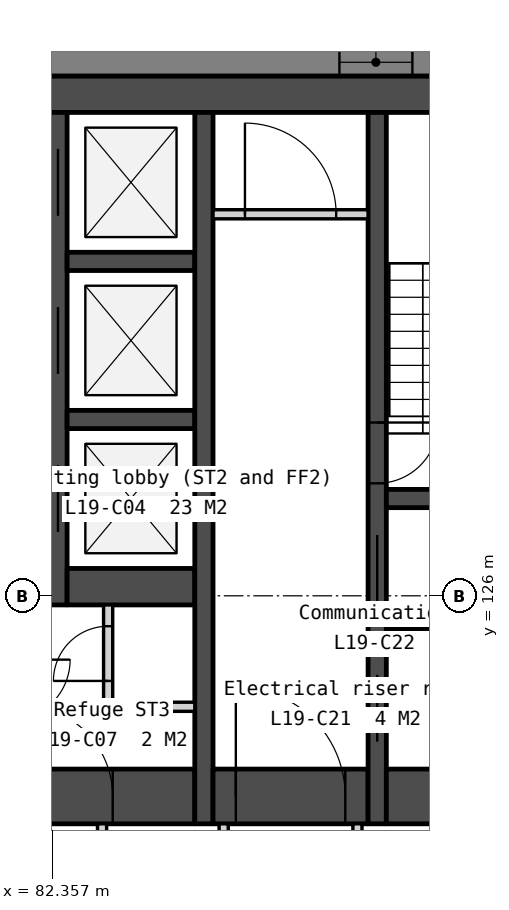
"""IFC4 building model, lengths in metres.
Left out: names, types, materials, properties, quantities, classifications, styles, units other than length and angle.
Written with IfcOpenShell. Run it as: python <this file> out.ifc"""

import sys

from ifc_helpers import new_model, si_unit, direction, frame, frame_2d, origin, place, context, subcontext, project, spatial, polyline, rectangle, outline, extrude, element, fill, save


model = new_model("IFC4")
c1 = context("Model", 3, precision=1e-05, world=origin(), true_north=direction((0.0, 1.0)))
c2 = subcontext(c1, "Body", "Model", "MODEL_VIEW")
j1 = project(units=[si_unit("LENGTHUNIT", "METRE"), si_unit("PLANEANGLEUNIT", "RADIAN")], contexts=[c1])
p1 = place(None, origin())
s1 = spatial("IfcSite", under=j1, at=p1, CompositionType="ELEMENT")
p2 = place(p1, origin())
s2 = spatial("IfcBuilding", under=s1, at=p2, CompositionType="ELEMENT")
p3 = place(p2, frame((0.0, 0.0, 81.8)))
s3 = spatial("IfcBuildingStorey", under=s2, at=p3, CompositionType="ELEMENT", Elevation=81.8)
p4 = place(p3, frame((66.0, 134.25, 0.0), z_axis=(0.0, 0.0, 1.0), x_axis=(1.0, 0.0, 0.0)))
e1 = element("IfcWall", 1, at=p4, inside=s3, PredefinedType="SOLIDWALL", context=c2, shape_type="SweptSolid", body=[
    extrude(rectangle(XDim=28.0, YDim=0.6, at=frame_2d((14.0, 0.0))), origin(), (0.0, 0.0, 1.0), 3.35),
])
p5 = place(p3, frame((81.8, 122.7, 0.0), z_axis=(0.0, 0.0, 1.0), x_axis=(1.0, 0.0, 0.0)))
e2 = element("IfcWall", 2, at=p5, inside=s3, PredefinedType="SOLIDWALL", context=c2, shape_type="SweptSolid", body=[
    extrude(rectangle(XDim=2.9, YDim=0.9, at=frame_2d((1.45, 0.0))), origin(), (0.0, 0.0, 1.0), 3.35),
])
p6 = place(p5, frame((0.05, 0.0, 0.0)))
e3 = element("IfcOpeningElement", 3, at=p6, cuts=e2, PredefinedType="OPENING", context=c2, shape_type="SweptSolid", body=[
    extrude(rectangle(XDim=1.5, YDim=2.1, at=frame_2d((0.75, 1.05))), frame((0.0, 0.46, 0.0), z_axis=(0.0, -1.0, 0.0), x_axis=(1.0, 0.0, 0.0)), (0.0, 0.0, 1.0), 0.92),
])
p7 = place(p3, frame((82.45, 133.95, 0.0), z_axis=(0.0, 0.0, 1.0), x_axis=(0.0, -1.0, 0.0)))
e4 = element("IfcWall", 4, at=p7, inside=s3, PredefinedType="SOLIDWALL", context=c2, shape_type="SweptSolid", body=[
    extrude(rectangle(XDim=8.1, YDim=0.3, at=frame_2d((4.05, 0.0))), origin(), (0.0, 0.0, 1.0), 3.35),
])
p8 = place(p7, frame((0.6, 0.0, 0.0)))
e5 = element("IfcOpeningElement", 5, at=p8, cuts=e4, PredefinedType="OPENING", context=c2, shape_type="SweptSolid", body=[
    extrude(rectangle(XDim=1.1, YDim=2.1, at=frame_2d((0.55, 1.05))), frame((0.0, 0.16, 0.0), z_axis=(0.0, -1.0, 0.0), x_axis=(1.0, 0.0, 0.0)), (0.0, 0.0, 1.0), 0.32),
])
p9 = place(p7, frame((3.2, 0.0, 0.0)))
e6 = element("IfcOpeningElement", 6, at=p9, cuts=e4, PredefinedType="OPENING", context=c2, shape_type="SweptSolid", body=[
    extrude(rectangle(XDim=1.1, YDim=2.1, at=frame_2d((0.55, 1.05))), frame((0.0, 0.16, 0.0), z_axis=(0.0, -1.0, 0.0), x_axis=(1.0, 0.0, 0.0)), (0.0, 0.0, 1.0), 0.32),
])
p10 = place(p7, frame((5.8, 0.0, 0.0)))
e7 = element("IfcOpeningElement", 7, at=p10, cuts=e4, PredefinedType="OPENING", context=c2, shape_type="SweptSolid", body=[
    extrude(rectangle(XDim=1.1, YDim=2.1, at=frame_2d((0.55, 1.05))), frame((0.0, 0.16, 0.0), z_axis=(0.0, -1.0, 0.0), x_axis=(1.0, 0.0, 0.0)), (0.0, 0.0, 1.0), 0.32),
])
for number, where, z_axis, x_axis in (
    (8, (82.6, 131.5, 0.0), (0.0, 0.0, 1.0), (1.0, 0.0, 0.0)),
    (9, (82.6, 128.9, 0.0), (0.0, 0.0, 1.0), (1.0, 0.0, 0.0)),
):
    element("IfcWall", number, at=place(p3, frame(where, z_axis=z_axis, x_axis=x_axis)), inside=s3, PredefinedType="SOLIDWALL", context=c2, shape_type="SweptSolid", body=[
        extrude(rectangle(XDim=2.1, YDim=0.3, at=frame_2d((1.05, 0.0))), origin(), (0.0, 0.0, 1.0), 3.35),
    ])
p11 = place(p3, frame((82.6, 126.15, 0.0), z_axis=(0.0, 0.0, 1.0), x_axis=(1.0, 0.0, 0.0)))
e10 = element("IfcWall", 10, at=p11, inside=s3, PredefinedType="SOLIDWALL", context=c2, shape_type="SweptSolid", body=[
    extrude(rectangle(XDim=2.1, YDim=0.6, at=frame_2d((1.05, 0.0))), origin(), (0.0, 0.0, 1.0), 3.35),
])
p12 = place(p3, frame((83.175, 122.25, 0.0), z_axis=(0.0, 0.0, 1.0), x_axis=(0.0, -1.0, 0.0)))
e11 = element("IfcWall", 11, at=p12, inside=s3, PredefinedType="PARTITIONING", context=c2, shape_type="SweptSolid", body=[
    extrude(rectangle(XDim=2.1, YDim=0.15, at=frame_2d((1.05, 0.0))), origin(), (0.0, 0.0, 1.0), 3.35),
])
p13 = place(p3, frame((83.275, 125.85, 0.0), z_axis=(0.0, 0.0, 1.0), x_axis=(0.0, -1.0, 0.0)))
e12 = element("IfcWall", 12, at=p13, inside=s3, PredefinedType="PARTITIONING", context=c2, shape_type="SweptSolid", body=[
    extrude(rectangle(XDim=1.75, YDim=0.15, at=frame_2d((0.875, 0.0))), origin(), (0.0, 0.0, 1.0), 3.35),
])
p14 = place(p13, frame((0.35, 0.0, 0.0)))
e13 = element("IfcOpeningElement", 13, at=p14, cuts=e12, PredefinedType="OPENING", context=c2, shape_type="SweptSolid", body=[
    extrude(rectangle(XDim=0.9, YDim=2.1, at=frame_2d((0.45, 1.05))), frame((0.0, 0.085, 0.0), z_axis=(0.0, -1.0, 0.0), x_axis=(1.0, 0.0, 0.0)), (0.0, 0.0, 1.0), 0.17),
])
p15 = place(p3, frame((83.35, 124.175, 0.0), z_axis=(0.0, 0.0, 1.0), x_axis=(1.0, 0.0, 0.0)))
e14 = element("IfcWall", 14, at=p15, inside=s3, PredefinedType="PARTITIONING", context=c2, shape_type="SweptSolid", body=[
    extrude(rectangle(XDim=1.35, YDim=0.15, at=frame_2d((0.675, 0.0))), origin(), (0.0, 0.0, 1.0), 3.35),
])
p16 = place(p3, frame((84.85, 133.95, 0.0), z_axis=(0.0, 0.0, 1.0), x_axis=(0.0, -1.0, 0.0)))
e15 = element("IfcWall", 15, at=p16, inside=s3, PredefinedType="SOLIDWALL", context=c2, shape_type="SweptSolid", body=[
    extrude(rectangle(XDim=11.7, YDim=0.3, at=frame_2d((5.85, 0.0))), origin(), (0.0, 0.0, 1.0), 3.35),
])
p17 = place(p3, frame((85.0, 132.275, 0.0), z_axis=(0.0, 0.0, 1.0), x_axis=(1.0, 0.0, 0.0)))
e16 = element("IfcWall", 16, at=p17, inside=s3, PredefinedType="PARTITIONING", context=c2, shape_type="SweptSolid", body=[
    extrude(rectangle(XDim=2.55, YDim=0.15, at=frame_2d((1.275, 0.0))), origin(), (0.0, 0.0, 1.0), 3.35),
])
p18 = place(p17, frame((0.525, 0.0, 0.0)))
e17 = element("IfcOpeningElement", 17, at=p18, cuts=e16, PredefinedType="OPENING", context=c2, shape_type="SweptSolid", body=[
    extrude(rectangle(XDim=1.5, YDim=2.1, at=frame_2d((0.75, 1.05))), frame((0.0, 0.085, 0.0), z_axis=(0.0, -1.0, 0.0), x_axis=(1.0, 0.0, 0.0)), (0.0, 0.0, 1.0), 0.17),
])
p19 = place(p3, frame((85.0, 122.7, 0.0), z_axis=(0.0, 0.0, 1.0), x_axis=(1.0, 0.0, 0.0)))
e18 = element("IfcWall", 18, at=p19, inside=s3, PredefinedType="SOLIDWALL", context=c2, shape_type="SweptSolid", body=[
    extrude(rectangle(XDim=2.55, YDim=0.9, at=frame_2d((1.275, 0.0))), origin(), (0.0, 0.0, 1.0), 3.35),
])
p20 = place(p19, frame((0.375, 0.0, 0.0)))
e19 = element("IfcOpeningElement", 19, at=p20, cuts=e18, PredefinedType="OPENING", context=c2, shape_type="SweptSolid", body=[
    extrude(rectangle(XDim=1.8, YDim=2.1, at=frame_2d((0.9, 1.05))), frame((0.0, 0.46, 0.0), z_axis=(0.0, -1.0, 0.0), x_axis=(1.0, 0.0, 0.0)), (0.0, 0.0, 1.0), 0.92),
])
p21 = place(p3, frame((85.175, 122.25, 0.0), z_axis=(0.0, 0.0, 1.0), x_axis=(0.0, -1.0, 0.0)))
e20 = element("IfcWall", 20, at=p21, inside=s3, PredefinedType="PARTITIONING", context=c2, shape_type="SweptSolid", body=[
    extrude(rectangle(XDim=2.1, YDim=0.15, at=frame_2d((1.05, 0.0))), origin(), (0.0, 0.0, 1.0), 3.35),
])
p22 = place(p21, frame((0.55, 0.0, 0.0)))
e21 = element("IfcOpeningElement", 21, at=p22, cuts=e20, PredefinedType="OPENING", context=c2, shape_type="SweptSolid", body=[
    extrude(rectangle(XDim=1.0, YDim=2.1, at=frame_2d((0.5, 1.05))), frame((0.0, 0.085, 0.0), z_axis=(0.0, -1.0, 0.0), x_axis=(1.0, 0.0, 0.0)), (0.0, 0.0, 1.0), 0.17),
])
p23 = place(p3, frame((87.375, 122.25, 0.0), z_axis=(0.0, 0.0, 1.0), x_axis=(0.0, -1.0, 0.0)))
e22 = element("IfcWall", 22, at=p23, inside=s3, PredefinedType="PARTITIONING", context=c2, shape_type="SweptSolid", body=[
    extrude(rectangle(XDim=2.1, YDim=0.15, at=frame_2d((1.05, 0.0))), origin(), (0.0, 0.0, 1.0), 3.35),
])
p24 = place(p3, frame((87.7, 133.95, 0.0), z_axis=(0.0, 0.0, 1.0), x_axis=(0.0, -1.0, 0.0)))
e23 = element("IfcWall", 23, at=p24, inside=s3, PredefinedType="SOLIDWALL", context=c2, shape_type="SweptSolid", body=[
    extrude(rectangle(XDim=11.7, YDim=0.3, at=frame_2d((5.85, 0.0))), origin(), (0.0, 0.0, 1.0), 3.35),
])
p25 = place(p24, frame((6.95, 0.0, 0.0)))
e24 = element("IfcOpeningElement", 24, at=p25, cuts=e23, PredefinedType="OPENING", context=c2, shape_type="SweptSolid", body=[
    extrude(rectangle(XDim=1.1, YDim=2.1, at=frame_2d((0.55, 1.05))), frame((0.0, 0.16, 0.0), z_axis=(0.0, -1.0, 0.0), x_axis=(1.0, 0.0, 0.0)), (0.0, 0.0, 1.0), 0.32),
])
p26 = place(p24, frame((5.1, 0.0, 0.0)))
e25 = element("IfcOpeningElement", 25, at=p26, cuts=e23, PredefinedType="OPENING", context=c2, shape_type="SweptSolid", body=[
    extrude(rectangle(XDim=1.0, YDim=2.1, at=frame_2d((0.5, 1.05))), frame((0.0, 0.16, 0.0), z_axis=(0.0, -1.0, 0.0), x_axis=(1.0, 0.0, 0.0)), (0.0, 0.0, 1.0), 0.32),
])
p27 = place(p24, frame((9.25, 0.0, 0.0)))
e26 = element("IfcOpeningElement", 26, at=p27, cuts=e23, PredefinedType="OPENING", context=c2, shape_type="SweptSolid", body=[
    extrude(rectangle(XDim=1.1, YDim=2.1, at=frame_2d((0.55, 1.05))), frame((0.0, 0.16, 0.0), z_axis=(0.0, -1.0, 0.0), x_axis=(1.0, 0.0, 0.0)), (0.0, 0.0, 1.0), 0.32),
])
for number, where, z_axis, x_axis in (
    (27, (87.85, 127.6, 0.0), (0.0, 0.0, 1.0), (1.0, 0.0, 0.0)),
    (28, (87.85, 125.3, 0.0), (0.0, 0.0, 1.0), (1.0, 0.0, 0.0)),
):
    element("IfcWall", number, at=place(p3, frame(where, z_axis=z_axis, x_axis=x_axis)), inside=s3, PredefinedType="SOLIDWALL", context=c2, shape_type="SweptSolid", body=[
        extrude(rectangle(XDim=2.55, YDim=0.3, at=frame_2d((1.275, 0.0))), origin(), (0.0, 0.0, 1.0), 3.35),
    ])
p28 = place(p3, frame((87.85, 122.7, 0.0), z_axis=(0.0, 0.0, 1.0), x_axis=(1.0, 0.0, 0.0)))
e29 = element("IfcWall", 29, at=p28, inside=s3, PredefinedType="SOLIDWALL", context=c2, shape_type="SweptSolid", body=[
    extrude(rectangle(XDim=2.55, YDim=0.9, at=frame_2d((1.275, 0.0))), origin(), (0.0, 0.0, 1.0), 3.35),
])
p29 = place(p3, frame((101.322, 134.775, -0.45), z_axis=(0.0, 0.0, 1.0), x_axis=(-1.0, 0.0, 0.0)))
e30 = element("IfcWall", 30, at=p29, inside=s3, PredefinedType="SOLIDWALL", context=c2, shape_type="SweptSolid", body=[
    extrude(outline(polyline([(42.643, 0.0), (42.643, 3.8), (0.0, 3.8), (0.0, 0.0), (42.643, 0.0)])), frame((0.0, 0.225, 0.0), z_axis=(0.0, -1.0, 0.0), x_axis=(1.0, 0.0, 0.0)), (0.0, 0.0, 1.0), 0.45),
])
p30 = place(p29, frame((2.814, 0.0, 1.35)))
e31 = element("IfcOpeningElement", 31, at=p30, cuts=e30, PredefinedType="OPENING", context=c2, shape_type="SweptSolid", body=[
    extrude(rectangle(XDim=1.2, YDim=1.5, at=frame_2d((0.6, 0.75))), frame((0.0, 0.235, 0.0), z_axis=(0.0, -1.0, 0.0), x_axis=(1.0, 0.0, 0.0)), (0.0, 0.0, 1.0), 0.47),
])
p31 = place(p29, frame((4.514, 0.0, 1.35)))
e32 = element("IfcOpeningElement", 32, at=p31, cuts=e30, PredefinedType="OPENING", context=c2, shape_type="SweptSolid", body=[
    extrude(rectangle(XDim=1.2, YDim=1.5, at=frame_2d((0.6, 0.75))), frame((0.0, 0.235, 0.0), z_axis=(0.0, -1.0, 0.0), x_axis=(1.0, 0.0, 0.0)), (0.0, 0.0, 1.0), 0.47),
])
p32 = place(p29, frame((11.343, 0.0, 1.35)))
e33 = element("IfcOpeningElement", 33, at=p32, cuts=e30, PredefinedType="OPENING", context=c2, shape_type="SweptSolid", body=[
    extrude(rectangle(XDim=1.2, YDim=1.5, at=frame_2d((0.6, 0.75))), frame((0.0, 0.235, 0.0), z_axis=(0.0, -1.0, 0.0), x_axis=(1.0, 0.0, 0.0)), (0.0, 0.0, 1.0), 0.47),
])
p33 = place(p29, frame((13.043, 0.0, 1.35)))
e34 = element("IfcOpeningElement", 34, at=p33, cuts=e30, PredefinedType="OPENING", context=c2, shape_type="SweptSolid", body=[
    extrude(rectangle(XDim=1.2, YDim=1.5, at=frame_2d((0.6, 0.75))), frame((0.0, 0.235, 0.0), z_axis=(0.0, -1.0, 0.0), x_axis=(1.0, 0.0, 0.0)), (0.0, 0.0, 1.0), 0.47),
])
p34 = place(p29, frame((19.872, 0.0, 1.35)))
e35 = element("IfcOpeningElement", 35, at=p34, cuts=e30, PredefinedType="OPENING", context=c2, shape_type="SweptSolid", body=[
    extrude(rectangle(XDim=1.2, YDim=1.5, at=frame_2d((0.6, 0.75))), frame((0.0, 0.235, 0.0), z_axis=(0.0, -1.0, 0.0), x_axis=(1.0, 0.0, 0.0)), (0.0, 0.0, 1.0), 0.47),
])
p35 = place(p29, frame((21.572, 0.0, 1.35)))
e36 = element("IfcOpeningElement", 36, at=p35, cuts=e30, PredefinedType="OPENING", context=c2, shape_type="SweptSolid", body=[
    extrude(rectangle(XDim=1.2, YDim=1.5, at=frame_2d((0.6, 0.75))), frame((0.0, 0.235, 0.0), z_axis=(0.0, -1.0, 0.0), x_axis=(1.0, 0.0, 0.0)), (0.0, 0.0, 1.0), 0.47),
])
p36 = place(p29, frame((28.4, 0.0, 1.35)))
e37 = element("IfcOpeningElement", 37, at=p36, cuts=e30, PredefinedType="OPENING", context=c2, shape_type="SweptSolid", body=[
    extrude(rectangle(XDim=1.2, YDim=1.5, at=frame_2d((0.6, 0.75))), frame((0.0, 0.235, 0.0), z_axis=(0.0, -1.0, 0.0), x_axis=(1.0, 0.0, 0.0)), (0.0, 0.0, 1.0), 0.47),
])
p37 = place(p29, frame((30.1, 0.0, 1.35)))
e38 = element("IfcOpeningElement", 38, at=p37, cuts=e30, PredefinedType="OPENING", context=c2, shape_type="SweptSolid", body=[
    extrude(rectangle(XDim=1.2, YDim=1.5, at=frame_2d((0.6, 0.75))), frame((0.0, 0.235, 0.0), z_axis=(0.0, -1.0, 0.0), x_axis=(1.0, 0.0, 0.0)), (0.0, 0.0, 1.0), 0.47),
])
p38 = place(p29, frame((36.929, 0.0, 1.35)))
e39 = element("IfcOpeningElement", 39, at=p38, cuts=e30, PredefinedType="OPENING", context=c2, shape_type="SweptSolid", body=[
    extrude(rectangle(XDim=1.2, YDim=1.5, at=frame_2d((0.6, 0.75))), frame((0.0, 0.235, 0.0), z_axis=(0.0, -1.0, 0.0), x_axis=(1.0, 0.0, 0.0)), (0.0, 0.0, 1.0), 0.47),
])
p39 = place(p29, frame((38.629, 0.0, 1.35)))
e40 = element("IfcOpeningElement", 40, at=p39, cuts=e30, PredefinedType="OPENING", context=c2, shape_type="SweptSolid", body=[
    extrude(rectangle(XDim=1.2, YDim=1.5, at=frame_2d((0.6, 0.75))), frame((0.0, 0.235, 0.0), z_axis=(0.0, -1.0, 0.0), x_axis=(1.0, 0.0, 0.0)), (0.0, 0.0, 1.0), 0.47),
])
p40 = place(p3, frame((82.605, 93.333, -0.45), z_axis=(0.0, 0.0, 1.0), x_axis=(0.500000478905, 0.866025127289, 0.0)))
e41 = element("IfcWall", 41, at=p40, inside=s3, PredefinedType="SOLIDWALL", context=c2, shape_type="SweptSolid", body=[
    extrude(outline(polyline([(42.643, 0.0), (42.643, 3.8), (0.0, 3.8), (0.0, 0.0), (42.643, 0.0)])), frame((0.0, 0.225, 0.0), z_axis=(0.0, -1.0, 0.0), x_axis=(1.0, 0.0, 0.0)), (0.0, 0.0, 1.0), 0.45),
])
p41 = place(p40, frame((2.814, 0.0, 1.35)))
e42 = element("IfcOpeningElement", 42, at=p41, cuts=e41, PredefinedType="OPENING", context=c2, shape_type="SweptSolid", body=[
    extrude(rectangle(XDim=1.2, YDim=1.5, at=frame_2d((0.6, 0.75))), frame((0.0, 0.235, 0.0), z_axis=(0.0, -1.0, 0.0), x_axis=(1.0, 0.0, 0.0)), (0.0, 0.0, 1.0), 0.47),
])
p42 = place(p40, frame((4.514, 0.0, 1.35)))
e43 = element("IfcOpeningElement", 43, at=p42, cuts=e41, PredefinedType="OPENING", context=c2, shape_type="SweptSolid", body=[
    extrude(rectangle(XDim=1.2, YDim=1.5, at=frame_2d((0.6, 0.75))), frame((0.0, 0.235, 0.0), z_axis=(0.0, -1.0, 0.0), x_axis=(1.0, 0.0, 0.0)), (0.0, 0.0, 1.0), 0.47),
])
p43 = place(p40, frame((11.343, 0.0, 1.35)))
e44 = element("IfcOpeningElement", 44, at=p43, cuts=e41, PredefinedType="OPENING", context=c2, shape_type="SweptSolid", body=[
    extrude(rectangle(XDim=1.2, YDim=1.5, at=frame_2d((0.6, 0.75))), frame((0.0, 0.235, 0.0), z_axis=(0.0, -1.0, 0.0), x_axis=(1.0, 0.0, 0.0)), (0.0, 0.0, 1.0), 0.47),
])
p44 = place(p40, frame((13.043, 0.0, 1.35)))
e45 = element("IfcOpeningElement", 45, at=p44, cuts=e41, PredefinedType="OPENING", context=c2, shape_type="SweptSolid", body=[
    extrude(rectangle(XDim=1.2, YDim=1.5, at=frame_2d((0.6, 0.75))), frame((0.0, 0.235, 0.0), z_axis=(0.0, -1.0, 0.0), x_axis=(1.0, 0.0, 0.0)), (0.0, 0.0, 1.0), 0.47),
])
p45 = place(p40, frame((19.872, 0.0, 1.35)))
e46 = element("IfcOpeningElement", 46, at=p45, cuts=e41, PredefinedType="OPENING", context=c2, shape_type="SweptSolid", body=[
    extrude(rectangle(XDim=1.2, YDim=1.5, at=frame_2d((0.6, 0.75))), frame((0.0, 0.235, 0.0), z_axis=(0.0, -1.0, 0.0), x_axis=(1.0, 0.0, 0.0)), (0.0, 0.0, 1.0), 0.47),
])
p46 = place(p40, frame((21.572, 0.0, 1.35)))
e47 = element("IfcOpeningElement", 47, at=p46, cuts=e41, PredefinedType="OPENING", context=c2, shape_type="SweptSolid", body=[
    extrude(rectangle(XDim=1.2, YDim=1.5, at=frame_2d((0.6, 0.75))), frame((0.0, 0.235, 0.0), z_axis=(0.0, -1.0, 0.0), x_axis=(1.0, 0.0, 0.0)), (0.0, 0.0, 1.0), 0.47),
])
p47 = place(p40, frame((28.4, 0.0, 1.35)))
e48 = element("IfcOpeningElement", 48, at=p47, cuts=e41, PredefinedType="OPENING", context=c2, shape_type="SweptSolid", body=[
    extrude(rectangle(XDim=1.2, YDim=1.5, at=frame_2d((0.6, 0.75))), frame((0.0, 0.235, 0.0), z_axis=(0.0, -1.0, 0.0), x_axis=(1.0, 0.0, 0.0)), (0.0, 0.0, 1.0), 0.47),
])
p48 = place(p40, frame((30.1, 0.0, 1.35)))
e49 = element("IfcOpeningElement", 49, at=p48, cuts=e41, PredefinedType="OPENING", context=c2, shape_type="SweptSolid", body=[
    extrude(rectangle(XDim=1.2, YDim=1.5, at=frame_2d((0.6, 0.75))), frame((0.0, 0.235, 0.0), z_axis=(0.0, -1.0, 0.0), x_axis=(1.0, 0.0, 0.0)), (0.0, 0.0, 1.0), 0.47),
])
p49 = place(p40, frame((36.929, 0.0, 1.35)))
e50 = element("IfcOpeningElement", 50, at=p49, cuts=e41, PredefinedType="OPENING", context=c2, shape_type="SweptSolid", body=[
    extrude(rectangle(XDim=1.2, YDim=1.5, at=frame_2d((0.6, 0.75))), frame((0.0, 0.235, 0.0), z_axis=(0.0, -1.0, 0.0), x_axis=(1.0, 0.0, 0.0)), (0.0, 0.0, 1.0), 0.47),
])
p50 = place(p40, frame((38.629, 0.0, 1.35)))
e51 = element("IfcOpeningElement", 51, at=p50, cuts=e41, PredefinedType="OPENING", context=c2, shape_type="SweptSolid", body=[
    extrude(rectangle(XDim=1.2, YDim=1.5, at=frame_2d((0.6, 0.75))), frame((0.0, 0.235, 0.0), z_axis=(0.0, -1.0, 0.0), x_axis=(1.0, 0.0, 0.0)), (0.0, 0.0, 1.0), 0.47),
])
p51 = place(p8, origin())
e52 = element("IfcDoor", 52, at=p51, inside=s3, OperationType="SLIDING_TO_LEFT", PredefinedType="DOOR", context=c2, shape_type="SweptSolid", body=[
    extrude(rectangle(XDim=1.1, YDim=2.1, at=frame_2d((0.55, 1.05))), frame((0.0, 0.025, 0.0), z_axis=(0.0, -1.0, 0.0), x_axis=(1.0, 0.0, 0.0)), (0.0, 0.0, 1.0), 0.05),
])
fill(e5, e52)
p52 = place(p9, origin())
e53 = element("IfcDoor", 53, at=p52, inside=s3, OperationType="SLIDING_TO_LEFT", PredefinedType="DOOR", context=c2, shape_type="SweptSolid", body=[
    extrude(rectangle(XDim=1.1, YDim=2.1, at=frame_2d((0.55, 1.05))), frame((0.0, 0.025, 0.0), z_axis=(0.0, -1.0, 0.0), x_axis=(1.0, 0.0, 0.0)), (0.0, 0.0, 1.0), 0.05),
])
fill(e6, e53)
p53 = place(p10, origin())
e54 = element("IfcDoor", 54, at=p53, inside=s3, OperationType="SLIDING_TO_LEFT", PredefinedType="DOOR", context=c2, shape_type="SweptSolid", body=[
    extrude(rectangle(XDim=1.1, YDim=2.1, at=frame_2d((0.55, 1.05))), frame((0.0, 0.025, 0.0), z_axis=(0.0, -1.0, 0.0), x_axis=(1.0, 0.0, 0.0)), (0.0, 0.0, 1.0), 0.05),
])
fill(e7, e54)
p54 = place(p25, origin())
e55 = element("IfcDoor", 55, at=p54, inside=s3, OperationType="SLIDING_TO_LEFT", PredefinedType="DOOR", context=c2, shape_type="SweptSolid", body=[
    extrude(rectangle(XDim=1.1, YDim=2.1, at=frame_2d((0.55, 1.05))), frame((0.0, 0.025, 0.0), z_axis=(0.0, -1.0, 0.0), x_axis=(1.0, 0.0, 0.0)), (0.0, 0.0, 1.0), 0.05),
])
fill(e24, e55)
p55 = place(p20, origin())
e56 = element("IfcDoor", 56, at=p55, inside=s3, OperationType="DOUBLE_DOOR_DOUBLE_SWING", PredefinedType="DOOR", context=c2, shape_type="SweptSolid", body=[
    extrude(rectangle(XDim=1.8, YDim=2.1, at=frame_2d((0.9, 1.05))), frame((0.0, 0.025, 0.0), z_axis=(0.0, -1.0, 0.0), x_axis=(1.0, 0.0, 0.0)), (0.0, 0.0, 1.0), 0.05),
])
fill(e19, e56)
p56 = place(p6, origin())
e57 = element("IfcDoor", 57, at=p56, inside=s3, OperationType="DOUBLE_DOOR_DOUBLE_SWING", PredefinedType="DOOR", context=c2, shape_type="SweptSolid", body=[
    extrude(rectangle(XDim=1.5, YDim=2.1, at=frame_2d((0.75, 1.05))), frame((0.0, 0.025, 0.0), z_axis=(0.0, -1.0, 0.0), x_axis=(1.0, 0.0, 0.0)), (0.0, 0.0, 1.0), 0.05),
])
fill(e3, e57)
p57 = place(p14, origin())
e58 = element("IfcDoor", 58, at=p57, inside=s3, OperationType="SINGLE_SWING_RIGHT", PredefinedType="DOOR", context=c2, shape_type="SweptSolid", body=[
    extrude(rectangle(XDim=0.9, YDim=2.1, at=frame_2d((0.45, 1.05))), frame((0.0, 0.025, 0.0), z_axis=(0.0, -1.0, 0.0), x_axis=(1.0, 0.0, 0.0)), (0.0, 0.0, 1.0), 0.05),
])
fill(e13, e58)
p58 = place(p18, origin())
e59 = element("IfcDoor", 59, at=p58, inside=s3, OperationType="DOUBLE_DOOR_DOUBLE_SWING", PredefinedType="DOOR", context=c2, shape_type="SweptSolid", body=[
    extrude(rectangle(XDim=1.5, YDim=2.1, at=frame_2d((0.75, 1.05))), frame((0.0, 0.025, 0.0), z_axis=(0.0, -1.0, 0.0), x_axis=(1.0, 0.0, 0.0)), (0.0, 0.0, 1.0), 0.05),
])
fill(e17, e59)
p59 = place(p26, origin())
e60 = element("IfcDoor", 60, at=p59, inside=s3, OperationType="SINGLE_SWING_LEFT", PredefinedType="DOOR", context=c2, shape_type="SweptSolid", body=[
    extrude(rectangle(XDim=1.0, YDim=2.1, at=frame_2d((0.5, 1.05))), frame((0.0, 0.025, 0.0), z_axis=(0.0, -1.0, 0.0), x_axis=(1.0, 0.0, 0.0)), (0.0, 0.0, 1.0), 0.05),
])
fill(e25, e60)
p60 = place(p27, origin())
e61 = element("IfcDoor", 61, at=p60, inside=s3, OperationType="SLIDING_TO_LEFT", PredefinedType="DOOR", context=c2, shape_type="SweptSolid", body=[
    extrude(rectangle(XDim=1.1, YDim=2.1, at=frame_2d((0.55, 1.05))), frame((0.0, 0.025, 0.0), z_axis=(0.0, -1.0, 0.0), x_axis=(1.0, 0.0, 0.0)), (0.0, 0.0, 1.0), 0.05),
])
fill(e26, e61)
p61 = place(p33, origin())
e62 = element("IfcWindow", 62, at=p61, inside=s3, PartitioningType="SINGLE_PANEL", PredefinedType="WINDOW", context=c2, shape_type="SweptSolid", body=[
    extrude(rectangle(XDim=1.2, YDim=1.5, at=frame_2d((0.6, 0.75))), frame((0.0, 0.03, 0.0), z_axis=(0.0, -1.0, 0.0), x_axis=(1.0, 0.0, 0.0)), (0.0, 0.0, 1.0), 0.06),
])
fill(e34, e62)
save(model, sys.argv[1])
